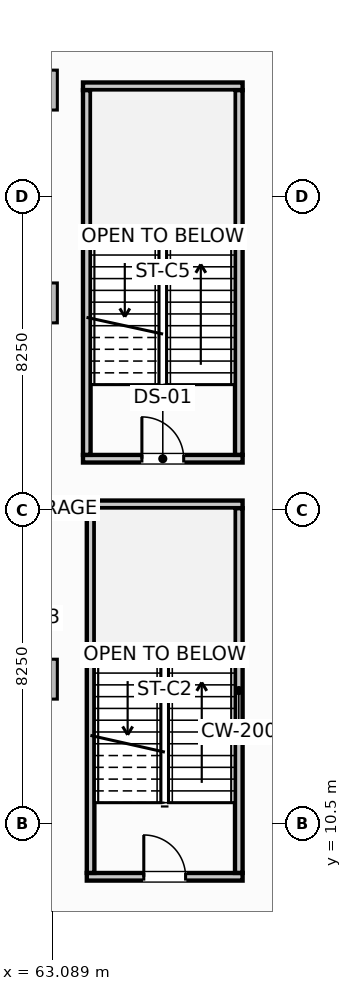
"""IFC4 building model, lengths in metres.
Left out: names, types, materials, properties, quantities, classifications, styles, units other than length and angle.
Written with IfcOpenShell. Run it as: python <this file> out.ifc"""

import sys

from ifc_helpers import new_model, si_unit, direction, frame, frame_2d, origin, origin_2d, place, context, subcontext, project, spatial, rectangle, extrude, element, fill, save


model = new_model("IFC4")
c1 = context("Model", 3, precision=1e-05, world=origin(), true_north=direction((0.0, 1.0)))
c2 = subcontext(c1, "Body", "Model", "MODEL_VIEW")
j1 = project(units=[si_unit("LENGTHUNIT", "METRE"), si_unit("PLANEANGLEUNIT", "RADIAN")], contexts=[c1])
p1 = place(None, origin())
s1 = spatial("IfcSite", under=j1, at=p1, CompositionType="ELEMENT")
p2 = place(p1, origin())
s2 = spatial("IfcBuilding", under=s1, at=p2, CompositionType="ELEMENT")
p3 = place(p2, frame((0.0, 0.0, -4.5)))
s3 = spatial("IfcBuildingStorey", under=s2, at=p3, CompositionType="ELEMENT", Elevation=-4.5)
for number, where, z_axis, x_axis in (
    (1, (62.7, 14.3, -0.32), (0.0, 0.0, 1.0), (1.0, 0.0, 0.0)),
    (2, (62.7, 24.2, -0.32), (0.0, 0.0, 1.0), (1.0, 0.0, 0.0)),
    (3, (62.7, 29.8, -0.32), (0.0, 0.0, 1.0), (1.0, 0.0, 0.0)),
):
    element("IfcColumn", number, at=place(p3, frame(where, z_axis=z_axis, x_axis=x_axis)), inside=s3, PredefinedType="COLUMN", context=c2, shape_type="SweptSolid", body=[
        extrude(rectangle(XDim=1.05, YDim=1.05, at=origin_2d()), origin(), (0.0, 0.0, 1.0), 4.46),
    ])
p4 = place(p3, frame((64.0, 9.1, -0.32), z_axis=(0.0, 0.0, 1.0), x_axis=(1.0, 0.0, 0.0)))
e4 = element("IfcWall", 4, at=p4, inside=s3, PredefinedType="SHEAR", context=c2, shape_type="SweptSolid", body=[
    extrude(rectangle(XDim=4.1, YDim=0.2, at=frame_2d((2.05, 0.0))), origin(), (0.0, 0.0, 1.0), 4.46),
])
p5 = place(p4, frame((1.5, 0.0, 0.32)))
e5 = element("IfcOpeningElement", 5, at=p5, cuts=e4, PredefinedType="OPENING", context=c2, shape_type="SweptSolid", body=[
    extrude(rectangle(XDim=1.1, YDim=2.15, at=frame_2d((0.55, 1.075))), frame((0.0, 0.11, 0.0), z_axis=(0.0, -1.0, 0.0), x_axis=(1.0, 0.0, 0.0)), (0.0, 0.0, 1.0), 0.22),
])
p6 = place(p3, frame((64.0, 18.9, -0.32), z_axis=(0.0, 0.0, 1.0), x_axis=(1.0, 0.0, 0.0)))
e6 = element("IfcWall", 6, at=p6, inside=s3, PredefinedType="SHEAR", context=c2, shape_type="SweptSolid", body=[
    extrude(rectangle(XDim=4.1, YDim=0.2, at=frame_2d((2.05, 0.0))), origin(), (0.0, 0.0, 1.0), 4.46),
])
for number, where, z_axis, x_axis in (
    (7, (64.1, 9.202, -0.32), (0.0, 0.0, 1.0), (0.0, 1.0, 0.0)),
    (8, (68.0, 9.202, -0.32), (0.0, 0.0, 1.0), (0.0, 1.0, 0.0)),
):
    element("IfcWall", number, at=place(p3, frame(where, z_axis=z_axis, x_axis=x_axis)), inside=s3, PredefinedType="SHEAR", context=c2, shape_type="SweptSolid", body=[
        extrude(rectangle(XDim=9.596, YDim=0.2, at=frame_2d((4.798, 0.0))), origin(), (0.0, 0.0, 1.0), 4.46),
    ])
p7 = place(p3, frame((63.9, 20.1, -0.32), z_axis=(0.0, 0.0, 1.0), x_axis=(1.0, 0.0, 0.0)))
e9 = element("IfcWall", 9, at=p7, inside=s3, PredefinedType="SHEAR", context=c2, shape_type="SweptSolid", body=[
    extrude(rectangle(XDim=4.2, YDim=0.2, at=frame_2d((2.1, 0.0))), origin(), (0.0, 0.0, 1.0), 4.46),
])
p8 = place(p7, frame((1.55, 0.0, 0.32)))
e10 = element("IfcOpeningElement", 10, at=p8, cuts=e9, PredefinedType="OPENING", context=c2, shape_type="SweptSolid", body=[
    extrude(rectangle(XDim=1.1, YDim=2.15, at=frame_2d((0.55, 1.075))), frame((0.0, 0.11, 0.0), z_axis=(0.0, -1.0, 0.0), x_axis=(1.0, 0.0, 0.0)), (0.0, 0.0, 1.0), 0.22),
])
p9 = place(p3, frame((63.9, 29.9, -0.32), z_axis=(0.0, 0.0, 1.0), x_axis=(1.0, 0.0, 0.0)))
e11 = element("IfcWall", 11, at=p9, inside=s3, PredefinedType="SHEAR", context=c2, shape_type="SweptSolid", body=[
    extrude(rectangle(XDim=4.2, YDim=0.2, at=frame_2d((2.1, 0.0))), origin(), (0.0, 0.0, 1.0), 4.46),
])
for number, where, z_axis, x_axis in (
    (12, (64.0, 20.202, -0.32), (0.0, 0.0, 1.0), (0.0, 1.0, 0.0)),
    (13, (68.0, 20.202, -0.32), (0.0, 0.0, 1.0), (0.0, 1.0, 0.0)),
):
    element("IfcWall", number, at=place(p3, frame(where, z_axis=z_axis, x_axis=x_axis)), inside=s3, PredefinedType="SHEAR", context=c2, shape_type="SweptSolid", body=[
        extrude(rectangle(XDim=9.596, YDim=0.2, at=frame_2d((4.798, 0.0))), origin(), (0.0, 0.0, 1.0), 4.46),
    ])
p10 = place(p5, origin())
e14 = element("IfcDoor", 14, at=p10, inside=s3, OperationType="SINGLE_SWING_LEFT", PredefinedType="DOOR", context=c2, shape_type="SweptSolid", body=[
    extrude(rectangle(XDim=1.1, YDim=2.15, at=frame_2d((0.55, 1.075))), frame((0.0, 0.025, 0.0), z_axis=(0.0, -1.0, 0.0), x_axis=(1.0, 0.0, 0.0)), (0.0, 0.0, 1.0), 0.05),
])
fill(e5, e14)
p11 = place(p8, origin())
e15 = element("IfcDoor", 15, at=p11, inside=s3, OperationType="SINGLE_SWING_LEFT", PredefinedType="DOOR", context=c2, shape_type="SweptSolid", body=[
    extrude(rectangle(XDim=1.1, YDim=2.15, at=frame_2d((0.55, 1.075))), frame((0.0, 0.025, 0.0), z_axis=(0.0, -1.0, 0.0), x_axis=(1.0, 0.0, 0.0)), (0.0, 0.0, 1.0), 0.05),
])
fill(e10, e15)
save(model, sys.argv[1])
